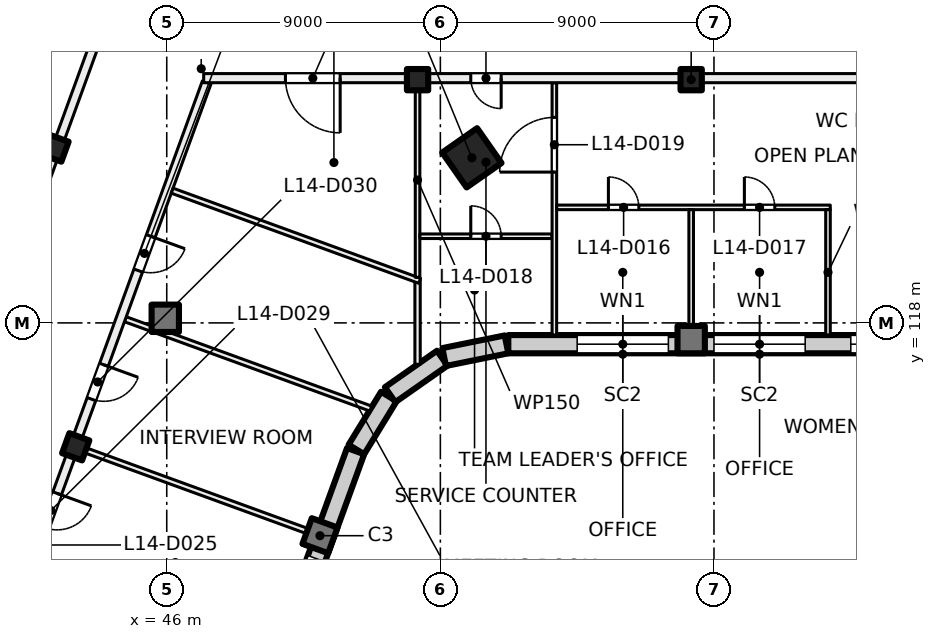
"""IFC4 building model, lengths in metres.
Left out: names, types, materials, properties, quantities, classifications, styles, units other than length and angle.
Written with IfcOpenShell. Run it as: python <this file> out.ifc"""

import sys

from ifc_helpers import new_model, si_unit, direction, frame, frame_2d, origin, origin_2d, place, context, subcontext, project, spatial, rectangle, hollow_rectangle, extrude, element, fill, save


model = new_model("IFC4")
c1 = context("Model", 3, precision=1e-05, world=origin(), true_north=direction((0.0, 1.0)))
c2 = subcontext(c1, "Body", "Model", "MODEL_VIEW")
j1 = project(units=[si_unit("LENGTHUNIT", "METRE"), si_unit("PLANEANGLEUNIT", "RADIAN")], contexts=[c1])
p1 = place(None, origin())
s1 = spatial("IfcSite", under=j1, at=p1, CompositionType="ELEMENT")
p2 = place(p1, origin())
s2 = spatial("IfcBuilding", under=s1, at=p2, CompositionType="ELEMENT")
p3 = place(p2, frame((0.0, 0.0, 63.5)))
s3 = spatial("IfcBuildingStorey", under=s2, at=p3, CompositionType="ELEMENT", Elevation=63.5)
p4 = place(p3, frame((56.036, 123.43, 0.0), z_axis=(0.0, 0.0, 1.0), x_axis=(0.573576436351, -0.819152044289, 0.0)))
e1 = element("IfcColumn", 1, at=p4, inside=s3, PredefinedType="COLUMN", context=c2, shape_type="SweptSolid", body=[
    extrude(hollow_rectangle(XDim=1.4, YDim=1.4, WallThickness=0.04, at=origin_2d()), origin(), (0.0, 0.0, 1.0), 4.0),
])
for number, where, z_axis, x_axis in (
    (2, (54.25, 126.0, 0.0), (0.0, 0.0, 1.0), (1.0, 0.0, 0.0)),
    (3, (63.25, 126.0, 0.0), (0.0, 0.0, 1.0), (1.0, 0.0, 0.0)),
):
    element("IfcColumn", number, at=place(p3, frame(where, z_axis=z_axis, x_axis=x_axis)), inside=s3, PredefinedType="COLUMN", context=c2, shape_type="SweptSolid", body=[
        extrude(rectangle(XDim=0.7, YDim=0.7, at=origin_2d()), origin(), (0.0, 0.0, 1.0), 4.0),
    ])
for number, where, z_axis, x_axis in (
    (4, (45.952, 118.152, 0.0), (0.0, 0.0, 1.0), (1.0, 0.0, 0.0)),
    (5, (63.25, 117.45, 0.0), (0.0, 0.0, 1.0), (1.0, 0.0, 0.0)),
):
    element("IfcColumn", number, at=place(p3, frame(where, z_axis=z_axis, x_axis=x_axis)), inside=s3, PredefinedType="COLUMN", context=c2, shape_type="SweptSolid", body=[
        extrude(rectangle(XDim=0.9, YDim=0.9, at=origin_2d()), origin(), (0.0, 0.0, 1.0), 4.0),
    ])
for number, where, z_axis, x_axis in (
    (6, (43.006, 113.925, 0.0), (0.0, 0.0, 1.0), (-0.342, -0.94, 0.0)),
    (7, (42.325, 123.751, 0.0), (0.0, 0.0, 1.0), (-0.342, -0.94, 0.0)),
):
    element("IfcColumn", number, at=place(p3, frame(where, z_axis=z_axis, x_axis=x_axis)), inside=s3, PredefinedType="COLUMN", context=c2, shape_type="SweptSolid", body=[
        extrude(rectangle(XDim=0.7, YDim=0.7, at=origin_2d()), origin(), (0.0, 0.0, 1.0), 4.0),
    ])
p5 = place(p3, frame((51.04, 111.001, 0.0), z_axis=(0.0, 0.0, 1.0), x_axis=(-0.342020143326, -0.939692620786, 0.0)))
e8 = element("IfcColumn", 8, at=p5, inside=s3, PredefinedType="COLUMN", context=c2, shape_type="SweptSolid", body=[
    extrude(rectangle(XDim=0.9, YDim=0.9, at=origin_2d()), origin(), (0.0, 0.0, 1.0), 4.0),
])
p6 = place(p3, frame((52.212, 113.783, 0.0), z_axis=(0.0, 0.0, 1.0), x_axis=(-0.34202521188, -0.939690775968, 0.0)))
e9 = element("IfcWall", 9, at=p6, inside=s3, PredefinedType="SOLIDWALL", context=c2, shape_type="SweptSolid", body=[
    extrude(rectangle(XDim=21.745, YDim=0.6, at=frame_2d((10.873, 0.0))), origin(), (0.0, 0.0, 1.0), 3.625),
])
p7 = place(p6, frame((3.765, 0.0, 0.9)))
e10 = element("IfcOpeningElement", 10, at=p7, cuts=e9, PredefinedType="OPENING", context=c2, shape_type="SweptSolid", body=[
    extrude(rectangle(XDim=3.0, YDim=2.4, at=frame_2d((1.5, 1.2))), frame((0.0, 0.31, 0.0), z_axis=(0.0, -1.0, 0.0), x_axis=(1.0, 0.0, 0.0)), (0.0, 0.0, 1.0), 0.62),
])
p8 = place(p6, frame((8.265, 0.0, 0.9)))
e11 = element("IfcOpeningElement", 11, at=p8, cuts=e9, PredefinedType="OPENING", context=c2, shape_type="SweptSolid", body=[
    extrude(rectangle(XDim=3.0, YDim=2.4, at=frame_2d((1.5, 1.2))), frame((0.0, 0.31, 0.0), z_axis=(0.0, -1.0, 0.0), x_axis=(1.0, 0.0, 0.0)), (0.0, 0.0, 1.0), 0.62),
])
p9 = place(p6, frame((12.765, 0.0, 0.9)))
e12 = element("IfcOpeningElement", 12, at=p9, cuts=e9, PredefinedType="OPENING", context=c2, shape_type="SweptSolid", body=[
    extrude(rectangle(XDim=3.0, YDim=2.4, at=frame_2d((1.5, 1.2))), frame((0.0, 0.31, 0.0), z_axis=(0.0, -1.0, 0.0), x_axis=(1.0, 0.0, 0.0)), (0.0, 0.0, 1.0), 0.62),
])
p10 = place(p6, frame((17.265, 0.0, 0.9)))
e13 = element("IfcOpeningElement", 13, at=p10, cuts=e9, PredefinedType="OPENING", context=c2, shape_type="SweptSolid", body=[
    extrude(rectangle(XDim=3.0, YDim=2.4, at=frame_2d((1.5, 1.2))), frame((0.0, 0.31, 0.0), z_axis=(0.0, -1.0, 0.0), x_axis=(1.0, 0.0, 0.0)), (0.0, 0.0, 1.0), 0.62),
])
p11 = place(p3, frame((53.305, 115.578, 0.0), z_axis=(0.0, 0.0, 1.0), x_axis=(-0.522402266438, -0.852699168535, 0.0)))
e14 = element("IfcWall", 14, at=p11, inside=s3, PredefinedType="SOLIDWALL", context=c2, shape_type="SweptSolid", body=[
    extrude(rectangle(XDim=2.042, YDim=0.6, at=frame_2d((1.021, 0.0))), origin(), (0.0, 0.0, 1.0), 3.625),
])
for number, where, z_axis, x_axis in (
    (15, (55.062, 116.839, 0.0), (0.0, 0.0, 1.0), (-0.819, -0.574, 0.0)),
    (16, (57.175, 117.294, 0.0), (0.0, 0.0, 1.0), (-0.98, -0.199, 0.0)),
):
    element("IfcWall", number, at=place(p3, frame(where, z_axis=z_axis, x_axis=x_axis)), inside=s3, PredefinedType="SOLIDWALL", context=c2, shape_type="SweptSolid", body=[
        extrude(rectangle(XDim=2.092, YDim=0.6, at=frame_2d((1.046, 0.0))), origin(), (0.0, 0.0, 1.0), 3.625),
    ])
p12 = place(p3, frame((90.98, 117.3, 0.0), z_axis=(0.0, 0.0, 1.0), x_axis=(-1.0, 0.0, 0.0)))
e17 = element("IfcWall", 17, at=p12, inside=s3, PredefinedType="SOLIDWALL", context=c2, shape_type="SweptSolid", body=[
    extrude(rectangle(XDim=33.745, YDim=0.6, at=frame_2d((16.873, 0.0))), origin(), (0.0, 0.0, 1.0), 3.625),
])
p13 = place(p12, frame((1.48, 0.0, 0.9)))
e18 = element("IfcOpeningElement", 18, at=p13, cuts=e17, PredefinedType="OPENING", context=c2, shape_type="SweptSolid", body=[
    extrude(rectangle(XDim=3.0, YDim=2.4, at=frame_2d((1.5, 1.2))), frame((0.0, 0.31, 0.0), z_axis=(0.0, -1.0, 0.0), x_axis=(1.0, 0.0, 0.0)), (0.0, 0.0, 1.0), 0.62),
])
p14 = place(p12, frame((5.98, 0.0, 0.9)))
e19 = element("IfcOpeningElement", 19, at=p14, cuts=e17, PredefinedType="OPENING", context=c2, shape_type="SweptSolid", body=[
    extrude(rectangle(XDim=3.0, YDim=2.4, at=frame_2d((1.5, 1.2))), frame((0.0, 0.31, 0.0), z_axis=(0.0, -1.0, 0.0), x_axis=(1.0, 0.0, 0.0)), (0.0, 0.0, 1.0), 0.62),
])
p15 = place(p12, frame((10.48, 0.0, 0.9)))
e20 = element("IfcOpeningElement", 20, at=p15, cuts=e17, PredefinedType="OPENING", context=c2, shape_type="SweptSolid", body=[
    extrude(rectangle(XDim=3.0, YDim=2.4, at=frame_2d((1.5, 1.2))), frame((0.0, 0.31, 0.0), z_axis=(0.0, -1.0, 0.0), x_axis=(1.0, 0.0, 0.0)), (0.0, 0.0, 1.0), 0.62),
])
p16 = place(p12, frame((14.98, 0.0, 0.9)))
e21 = element("IfcOpeningElement", 21, at=p16, cuts=e17, PredefinedType="OPENING", context=c2, shape_type="SweptSolid", body=[
    extrude(rectangle(XDim=3.0, YDim=2.4, at=frame_2d((1.5, 1.2))), frame((0.0, 0.31, 0.0), z_axis=(0.0, -1.0, 0.0), x_axis=(1.0, 0.0, 0.0)), (0.0, 0.0, 1.0), 0.62),
])
p17 = place(p12, frame((19.48, 0.0, 0.9)))
e22 = element("IfcOpeningElement", 22, at=p17, cuts=e17, PredefinedType="OPENING", context=c2, shape_type="SweptSolid", body=[
    extrude(rectangle(XDim=3.0, YDim=2.4, at=frame_2d((1.5, 1.2))), frame((0.0, 0.31, 0.0), z_axis=(0.0, -1.0, 0.0), x_axis=(1.0, 0.0, 0.0)), (0.0, 0.0, 1.0), 0.62),
])
p18 = place(p12, frame((23.98, 0.0, 0.9)))
e23 = element("IfcOpeningElement", 23, at=p18, cuts=e17, PredefinedType="OPENING", context=c2, shape_type="SweptSolid", body=[
    extrude(rectangle(XDim=3.0, YDim=2.4, at=frame_2d((1.5, 1.2))), frame((0.0, 0.31, 0.0), z_axis=(0.0, -1.0, 0.0), x_axis=(1.0, 0.0, 0.0)), (0.0, 0.0, 1.0), 0.62),
])
p19 = place(p12, frame((28.48, 0.0, 0.9)))
e24 = element("IfcOpeningElement", 24, at=p19, cuts=e17, PredefinedType="OPENING", context=c2, shape_type="SweptSolid", body=[
    extrude(rectangle(XDim=3.0, YDim=2.4, at=frame_2d((1.5, 1.2))), frame((0.0, 0.31, 0.0), z_axis=(0.0, -1.0, 0.0), x_axis=(1.0, 0.0, 0.0)), (0.0, 0.0, 1.0), 0.62),
])
p20 = place(p3, frame((32.881, 97.657, 0.0), z_axis=(0.0, 0.0, 1.0), x_axis=(0.342017360004, 0.939693633828, 0.0)))
e25 = element("IfcWall", 25, at=p20, inside=s3, PredefinedType="PARTITIONING", context=c2, shape_type="SweptSolid", body=[
    extrude(rectangle(XDim=34.516, YDim=0.3, at=frame_2d((17.258, 0.0))), origin(), (0.0, 0.0, 1.0), 3.625),
])
p21 = place(p20, frame((12.975, 0.0, 0.0)))
e26 = element("IfcOpeningElement", 26, at=p21, cuts=e25, PredefinedType="OPENING", context=c2, shape_type="SweptSolid", body=[
    extrude(rectangle(XDim=1.8, YDim=2.1, at=frame_2d((0.9, 1.05))), frame((0.0, 0.16, 0.0), z_axis=(0.0, -1.0, 0.0), x_axis=(1.0, 0.0, 0.0)), (0.0, 0.0, 1.0), 0.32),
])
p22 = place(p3, frame((34.431, 126.624, 0.0), z_axis=(0.0, 0.0, 1.0), x_axis=(0.939687752599, -0.342033518263, 0.0)))
e27 = element("IfcWall", 27, at=p22, inside=s3, PredefinedType="PARTITIONING", context=c2, shape_type="SweptSolid", body=[
    extrude(rectangle(XDim=8.301, YDim=0.15, at=frame_2d((4.15, 0.0))), origin(), (0.0, 0.0, 1.0), 3.625),
])
p23 = place(p3, frame((43.1, 113.891, 0.0), z_axis=(0.0, 0.0, 1.0), x_axis=(0.939670544866, -0.342080790328, 0.0)))
e28 = element("IfcWall", 28, at=p23, inside=s3, PredefinedType="PARTITIONING", context=c2, shape_type="SweptSolid", body=[
    extrude(rectangle(XDim=8.3, YDim=0.175, at=frame_2d((4.15, 0.0))), origin(), (0.0, 0.0, 1.0), 3.625),
])
p24 = place(p3, frame((44.639, 118.12, 0.0), z_axis=(0.0, 0.0, 1.0), x_axis=(0.939669707102, -0.342083091593, 0.0)))
e29 = element("IfcWall", 29, at=p24, inside=s3, PredefinedType="PARTITIONING", context=c2, shape_type="SweptSolid", body=[
    extrude(rectangle(XDim=8.589, YDim=0.175, at=frame_2d((4.295, 0.0))), origin(), (0.0, 0.0, 1.0), 3.625),
])
p25 = place(p3, frame((47.314, 125.909, 0.0), z_axis=(0.0, 0.0, 1.0), x_axis=(-0.342010770371, -0.939696032209, 0.0)))
e30 = element("IfcWall", 30, at=p25, inside=s3, PredefinedType="PARTITIONING", context=c2, shape_type="SweptSolid", body=[
    extrude(rectangle(XDim=31.485, YDim=0.3, at=frame_2d((15.742, 0.0))), origin(), (0.0, 0.0, 1.0), 3.625),
])
p26 = place(p25, frame((28.259, 0.0, 0.0)))
e31 = element("IfcOpeningElement", 31, at=p26, cuts=e30, PredefinedType="OPENING", context=c2, shape_type="SweptSolid", body=[
    extrude(rectangle(XDim=1.2, YDim=2.1, at=frame_2d((0.6, 1.05))), frame((0.0, 0.16, 0.0), z_axis=(0.0, -1.0, 0.0), x_axis=(1.0, 0.0, 0.0)), (0.0, 0.0, 1.0), 0.32),
])
p27 = place(p25, frame((23.484, 0.0, 0.0)))
e32 = element("IfcOpeningElement", 32, at=p27, cuts=e30, PredefinedType="OPENING", context=c2, shape_type="SweptSolid", body=[
    extrude(rectangle(XDim=1.0, YDim=2.1, at=frame_2d((0.5, 1.05))), frame((0.0, 0.16, 0.0), z_axis=(0.0, -1.0, 0.0), x_axis=(1.0, 0.0, 0.0)), (0.0, 0.0, 1.0), 0.32),
])
p28 = place(p25, frame((18.984, 0.0, 0.0)))
e33 = element("IfcOpeningElement", 33, at=p28, cuts=e30, PredefinedType="OPENING", context=c2, shape_type="SweptSolid", body=[
    extrude(rectangle(XDim=1.0, YDim=2.1, at=frame_2d((0.5, 1.05))), frame((0.0, 0.16, 0.0), z_axis=(0.0, -1.0, 0.0), x_axis=(1.0, 0.0, 0.0)), (0.0, 0.0, 1.0), 0.32),
])
p29 = place(p25, frame((14.385, 0.0, 0.0)))
e34 = element("IfcOpeningElement", 34, at=p29, cuts=e30, PredefinedType="OPENING", context=c2, shape_type="SweptSolid", body=[
    extrude(rectangle(XDim=1.2, YDim=2.1, at=frame_2d((0.6, 1.05))), frame((0.0, 0.16, 0.0), z_axis=(0.0, -1.0, 0.0), x_axis=(1.0, 0.0, 0.0)), (0.0, 0.0, 1.0), 0.32),
])
p30 = place(p25, frame((9.885, 0.0, 0.0)))
e35 = element("IfcOpeningElement", 35, at=p30, cuts=e30, PredefinedType="OPENING", context=c2, shape_type="SweptSolid", body=[
    extrude(rectangle(XDim=1.2, YDim=2.1, at=frame_2d((0.6, 1.05))), frame((0.0, 0.16, 0.0), z_axis=(0.0, -1.0, 0.0), x_axis=(1.0, 0.0, 0.0)), (0.0, 0.0, 1.0), 0.32),
])
p31 = place(p25, frame((5.384, 0.0, 0.0)))
e36 = element("IfcOpeningElement", 36, at=p31, cuts=e30, PredefinedType="OPENING", context=c2, shape_type="SweptSolid", body=[
    extrude(rectangle(XDim=1.2, YDim=2.1, at=frame_2d((0.6, 1.05))), frame((0.0, 0.16, 0.0), z_axis=(0.0, -1.0, 0.0), x_axis=(1.0, 0.0, 0.0)), (0.0, 0.0, 1.0), 0.32),
])
p32 = place(p3, frame((54.25, 116.637, 0.0), z_axis=(0.0, 0.0, 1.0), x_axis=(0.0, 1.0, 0.0)))
e37 = element("IfcWall", 37, at=p32, inside=s3, PredefinedType="PARTITIONING", context=c2, shape_type="SweptSolid", body=[
    extrude(rectangle(XDim=2.776, YDim=0.175, at=frame_2d((1.388, 0.0))), origin(), (0.0, 0.0, 1.0), 3.625),
])
p33 = place(p3, frame((54.32, 119.384, 0.0), z_axis=(0.0, 0.0, 1.0), x_axis=(-0.939632908118, 0.342184157994, 0.0)))
e38 = element("IfcWall", 38, at=p33, inside=s3, PredefinedType="PARTITIONING", context=c2, shape_type="SweptSolid", body=[
    extrude(rectangle(XDim=8.665, YDim=0.175, at=frame_2d((4.333, 0.0))), origin(), (0.0, 0.0, 1.0), 3.625),
])
p34 = place(p3, frame((54.25, 119.498, 0.0), z_axis=(0.0, 0.0, 1.0), x_axis=(0.0, 1.0, 0.0)))
e39 = element("IfcWall", 39, at=p34, inside=s3, PredefinedType="PARTITIONING", context=c2, shape_type="SweptSolid", body=[
    extrude(rectangle(XDim=6.402, YDim=0.15, at=frame_2d((3.201, 0.0))), origin(), (0.0, 0.0, 1.0), 3.625),
])
p35 = place(p3, frame((54.325, 120.85, 0.0), z_axis=(0.0, 0.0, 1.0), x_axis=(1.0, 0.0, 0.0)))
e40 = element("IfcWall", 40, at=p35, inside=s3, PredefinedType="PARTITIONING", context=c2, shape_type="SweptSolid", body=[
    extrude(rectangle(XDim=4.35, YDim=0.15, at=frame_2d((2.175, 0.0))), origin(), (0.0, 0.0, 1.0), 3.625),
])
p36 = place(p35, frame((1.675, 0.0, 0.0)))
e41 = element("IfcOpeningElement", 41, at=p36, cuts=e40, PredefinedType="OPENING", context=c2, shape_type="SweptSolid", body=[
    extrude(rectangle(XDim=1.0, YDim=2.1, at=frame_2d((0.5, 1.05))), frame((0.0, 0.085, 0.0), z_axis=(0.0, -1.0, 0.0), x_axis=(1.0, 0.0, 0.0)), (0.0, 0.0, 1.0), 0.17),
])
p37 = place(p3, frame((58.75, 117.6, 0.0), z_axis=(0.0, 0.0, 1.0), x_axis=(0.0, 1.0, 0.0)))
e42 = element("IfcWall", 42, at=p37, inside=s3, PredefinedType="PARTITIONING", context=c2, shape_type="SweptSolid", body=[
    extrude(rectangle(XDim=8.3, YDim=0.15, at=frame_2d((4.15, 0.0))), origin(), (0.0, 0.0, 1.0), 3.625),
])
p38 = place(p37, frame((5.36, 0.0, 0.0)))
e43 = element("IfcOpeningElement", 43, at=p38, cuts=e42, PredefinedType="OPENING", context=c2, shape_type="SweptSolid", body=[
    extrude(rectangle(XDim=1.8, YDim=2.1, at=frame_2d((0.9, 1.05))), frame((0.0, 0.085, 0.0), z_axis=(0.0, -1.0, 0.0), x_axis=(1.0, 0.0, 0.0)), (0.0, 0.0, 1.0), 0.17),
])
p39 = place(p3, frame((58.825, 121.8, 0.0), z_axis=(0.0, 0.0, 1.0), x_axis=(1.0, 0.0, 0.0)))
e44 = element("IfcWall", 44, at=p39, inside=s3, PredefinedType="PARTITIONING", context=c2, shape_type="SweptSolid", body=[
    extrude(rectangle(XDim=9.0, YDim=0.15, at=frame_2d((4.5, 0.0))), origin(), (0.0, 0.0, 1.0), 3.625),
])
p40 = place(p39, frame((1.702, 0.0, 0.0)))
e45 = element("IfcOpeningElement", 45, at=p40, cuts=e44, PredefinedType="OPENING", context=c2, shape_type="SweptSolid", body=[
    extrude(rectangle(XDim=1.0, YDim=2.1, at=frame_2d((0.5, 1.05))), frame((0.0, 0.085, 0.0), z_axis=(0.0, -1.0, 0.0), x_axis=(1.0, 0.0, 0.0)), (0.0, 0.0, 1.0), 0.17),
])
p41 = place(p39, frame((6.175, 0.0, 0.0)))
e46 = element("IfcOpeningElement", 46, at=p41, cuts=e44, PredefinedType="OPENING", context=c2, shape_type="SweptSolid", body=[
    extrude(rectangle(XDim=1.0, YDim=2.1, at=frame_2d((0.5, 1.05))), frame((0.0, 0.085, 0.0), z_axis=(0.0, -1.0, 0.0), x_axis=(1.0, 0.0, 0.0)), (0.0, 0.0, 1.0), 0.17),
])
for number, where, z_axis, x_axis in (
    (47, (63.25, 121.725, 0.0), (0.0, 0.0, 1.0), (0.0, -1.0, 0.0)),
    (48, (67.75, 117.6, 0.0), (0.0, 0.0, 1.0), (0.0, 1.0, 0.0)),
):
    element("IfcWall", number, at=place(p3, frame(where, z_axis=z_axis, x_axis=x_axis)), inside=s3, PredefinedType="PARTITIONING", context=c2, shape_type="SweptSolid", body=[
        extrude(rectangle(XDim=4.125, YDim=0.15, at=frame_2d((2.062, 0.0))), origin(), (0.0, 0.0, 1.0), 3.625),
    ])
p42 = place(p3, frame((91.0, 126.05, 0.0), z_axis=(0.0, 0.0, 1.0), x_axis=(-1.0, 0.0, 0.0)))
e49 = element("IfcWall", 49, at=p42, inside=s3, PredefinedType="PARTITIONING", context=c2, shape_type="SweptSolid", body=[
    extrude(rectangle(XDim=43.785, YDim=0.3, at=frame_2d((21.893, 0.0))), origin(), (0.0, 0.0, 1.0), 3.625),
])
p43 = place(p42, frame((4.375, 0.0, 0.0)))
e50 = element("IfcOpeningElement", 50, at=p43, cuts=e49, PredefinedType="OPENING", context=c2, shape_type="SweptSolid", body=[
    extrude(rectangle(XDim=1.0, YDim=2.1, at=frame_2d((0.5, 1.05))), frame((0.0, 0.16, 0.0), z_axis=(0.0, -1.0, 0.0), x_axis=(1.0, 0.0, 0.0)), (0.0, 0.0, 1.0), 0.32),
])
p44 = place(p42, frame((15.0, 0.0, 0.0)))
e51 = element("IfcOpeningElement", 51, at=p44, cuts=e49, PredefinedType="OPENING", context=c2, shape_type="SweptSolid", body=[
    extrude(rectangle(XDim=1.0, YDim=2.1, at=frame_2d((0.5, 1.05))), frame((0.0, 0.16, 0.0), z_axis=(0.0, -1.0, 0.0), x_axis=(1.0, 0.0, 0.0)), (0.0, 0.0, 1.0), 0.32),
])
p45 = place(p42, frame((34.0, 0.0, 0.0)))
e52 = element("IfcOpeningElement", 52, at=p45, cuts=e49, PredefinedType="OPENING", context=c2, shape_type="SweptSolid", body=[
    extrude(rectangle(XDim=1.0, YDim=2.1, at=frame_2d((0.5, 1.05))), frame((0.0, 0.16, 0.0), z_axis=(0.0, -1.0, 0.0), x_axis=(1.0, 0.0, 0.0)), (0.0, 0.0, 1.0), 0.32),
])
p46 = place(p42, frame((39.296, 0.0, 0.0)))
e53 = element("IfcOpeningElement", 53, at=p46, cuts=e49, PredefinedType="OPENING", context=c2, shape_type="SweptSolid", body=[
    extrude(rectangle(XDim=1.8, YDim=2.1, at=frame_2d((0.9, 1.05))), frame((0.0, 0.16, 0.0), z_axis=(0.0, -1.0, 0.0), x_axis=(1.0, 0.0, 0.0)), (0.0, 0.0, 1.0), 0.32),
])
p47 = place(p7, origin())
e54 = element("IfcWindow", 54, at=p47, inside=s3, PartitioningType="SINGLE_PANEL", PredefinedType="WINDOW", context=c2, shape_type="SweptSolid", body=[
    extrude(rectangle(XDim=3.0, YDim=2.4, at=frame_2d((1.5, 1.2))), frame((0.0, 0.03, 0.0), z_axis=(0.0, -1.0, 0.0), x_axis=(1.0, 0.0, 0.0)), (0.0, 0.0, 1.0), 0.06),
])
fill(e10, e54)
p48 = place(p17, origin())
e55 = element("IfcWindow", 55, at=p48, inside=s3, PartitioningType="SINGLE_PANEL", PredefinedType="WINDOW", context=c2, shape_type="SweptSolid", body=[
    extrude(rectangle(XDim=3.0, YDim=2.4, at=frame_2d((1.5, 1.2))), frame((0.0, 0.03, 0.0), z_axis=(0.0, -1.0, 0.0), x_axis=(1.0, 0.0, 0.0)), (0.0, 0.0, 1.0), 0.06),
])
fill(e22, e55)
p49 = place(p18, origin())
e56 = element("IfcWindow", 56, at=p49, inside=s3, PartitioningType="SINGLE_PANEL", PredefinedType="WINDOW", context=c2, shape_type="SweptSolid", body=[
    extrude(rectangle(XDim=3.0, YDim=2.4, at=frame_2d((1.5, 1.2))), frame((0.0, 0.03, 0.0), z_axis=(0.0, -1.0, 0.0), x_axis=(1.0, 0.0, 0.0)), (0.0, 0.0, 1.0), 0.06),
])
fill(e23, e56)
p50 = place(p19, origin())
e57 = element("IfcWindow", 57, at=p50, inside=s3, PartitioningType="SINGLE_PANEL", PredefinedType="WINDOW", context=c2, shape_type="SweptSolid", body=[
    extrude(rectangle(XDim=3.0, YDim=2.4, at=frame_2d((1.5, 1.2))), frame((0.0, 0.03, 0.0), z_axis=(0.0, -1.0, 0.0), x_axis=(1.0, 0.0, 0.0)), (0.0, 0.0, 1.0), 0.06),
])
fill(e24, e57)
p51 = place(p45, origin())
e58 = element("IfcDoor", 58, at=p51, inside=s3, OperationType="SINGLE_SWING_LEFT", PredefinedType="DOOR", context=c2, shape_type="SweptSolid", body=[
    extrude(rectangle(XDim=1.0, YDim=2.1, at=frame_2d((0.5, 1.05))), frame((0.0, 0.025, 0.0), z_axis=(0.0, -1.0, 0.0), x_axis=(1.0, 0.0, 0.0)), (0.0, 0.0, 1.0), 0.05),
])
fill(e52, e58)
p52 = place(p40, origin())
e59 = element("IfcDoor", 59, at=p52, inside=s3, OperationType="SINGLE_SWING_LEFT", PredefinedType="DOOR", context=c2, shape_type="SweptSolid", body=[
    extrude(rectangle(XDim=1.0, YDim=2.1, at=frame_2d((0.5, 1.05))), frame((0.0, 0.025, 0.0), z_axis=(0.0, -1.0, 0.0), x_axis=(1.0, 0.0, 0.0)), (0.0, 0.0, 1.0), 0.05),
])
fill(e45, e59)
p53 = place(p41, origin())
e60 = element("IfcDoor", 60, at=p53, inside=s3, OperationType="SINGLE_SWING_RIGHT", PredefinedType="DOOR", context=c2, shape_type="SweptSolid", body=[
    extrude(rectangle(XDim=1.0, YDim=2.1, at=frame_2d((0.5, 1.05))), frame((0.0, 0.025, 0.0), z_axis=(0.0, -1.0, 0.0), x_axis=(1.0, 0.0, 0.0)), (0.0, 0.0, 1.0), 0.05),
])
fill(e46, e60)
p54 = place(p36, origin())
e61 = element("IfcDoor", 61, at=p54, inside=s3, OperationType="SINGLE_SWING_LEFT", PredefinedType="DOOR", context=c2, shape_type="SweptSolid", body=[
    extrude(rectangle(XDim=1.0, YDim=2.1, at=frame_2d((0.5, 1.05))), frame((0.0, 0.025, 0.0), z_axis=(0.0, -1.0, 0.0), x_axis=(1.0, 0.0, 0.0)), (0.0, 0.0, 1.0), 0.05),
])
fill(e41, e61)
p55 = place(p38, origin())
e62 = element("IfcDoor", 62, at=p55, inside=s3, OperationType="DOUBLE_DOOR_SINGLE_SWING", PredefinedType="DOOR", context=c2, shape_type="SweptSolid", body=[
    extrude(rectangle(XDim=1.8, YDim=2.1, at=frame_2d((0.9, 1.05))), frame((0.0, 0.025, 0.0), z_axis=(0.0, -1.0, 0.0), x_axis=(1.0, 0.0, 0.0)), (0.0, 0.0, 1.0), 0.05),
])
fill(e43, e62)
p56 = place(p29, origin())
e63 = element("IfcDoor", 63, at=p56, inside=s3, OperationType="DOUBLE_DOOR_SINGLE_SWING", PredefinedType="DOOR", context=c2, shape_type="SweptSolid", body=[
    extrude(rectangle(XDim=1.2, YDim=2.1, at=frame_2d((0.6, 1.05))), frame((0.0, 0.025, 0.0), z_axis=(0.0, -1.0, 0.0), x_axis=(1.0, 0.0, 0.0)), (0.0, 0.0, 1.0), 0.05),
])
fill(e34, e63)
p57 = place(p30, origin())
e64 = element("IfcDoor", 64, at=p57, inside=s3, OperationType="DOUBLE_DOOR_SINGLE_SWING", PredefinedType="DOOR", context=c2, shape_type="SweptSolid", body=[
    extrude(rectangle(XDim=1.2, YDim=2.1, at=frame_2d((0.6, 1.05))), frame((0.0, 0.025, 0.0), z_axis=(0.0, -1.0, 0.0), x_axis=(1.0, 0.0, 0.0)), (0.0, 0.0, 1.0), 0.05),
])
fill(e35, e64)
p58 = place(p31, origin())
e65 = element("IfcDoor", 65, at=p58, inside=s3, OperationType="DOUBLE_DOOR_SINGLE_SWING", PredefinedType="DOOR", context=c2, shape_type="SweptSolid", body=[
    extrude(rectangle(XDim=1.2, YDim=2.1, at=frame_2d((0.6, 1.05))), frame((0.0, 0.025, 0.0), z_axis=(0.0, -1.0, 0.0), x_axis=(1.0, 0.0, 0.0)), (0.0, 0.0, 1.0), 0.05),
])
fill(e36, e65)
p59 = place(p46, origin())
e66 = element("IfcDoor", 66, at=p59, inside=s3, OperationType="DOUBLE_DOOR_SINGLE_SWING", PredefinedType="DOOR", context=c2, shape_type="SweptSolid", body=[
    extrude(rectangle(XDim=1.8, YDim=2.1, at=frame_2d((0.9, 1.05))), frame((0.0, 0.025, 0.0), z_axis=(0.0, -1.0, 0.0), x_axis=(1.0, 0.0, 0.0)), (0.0, 0.0, 1.0), 0.05),
])
fill(e53, e66)
save(model, sys.argv[1])
